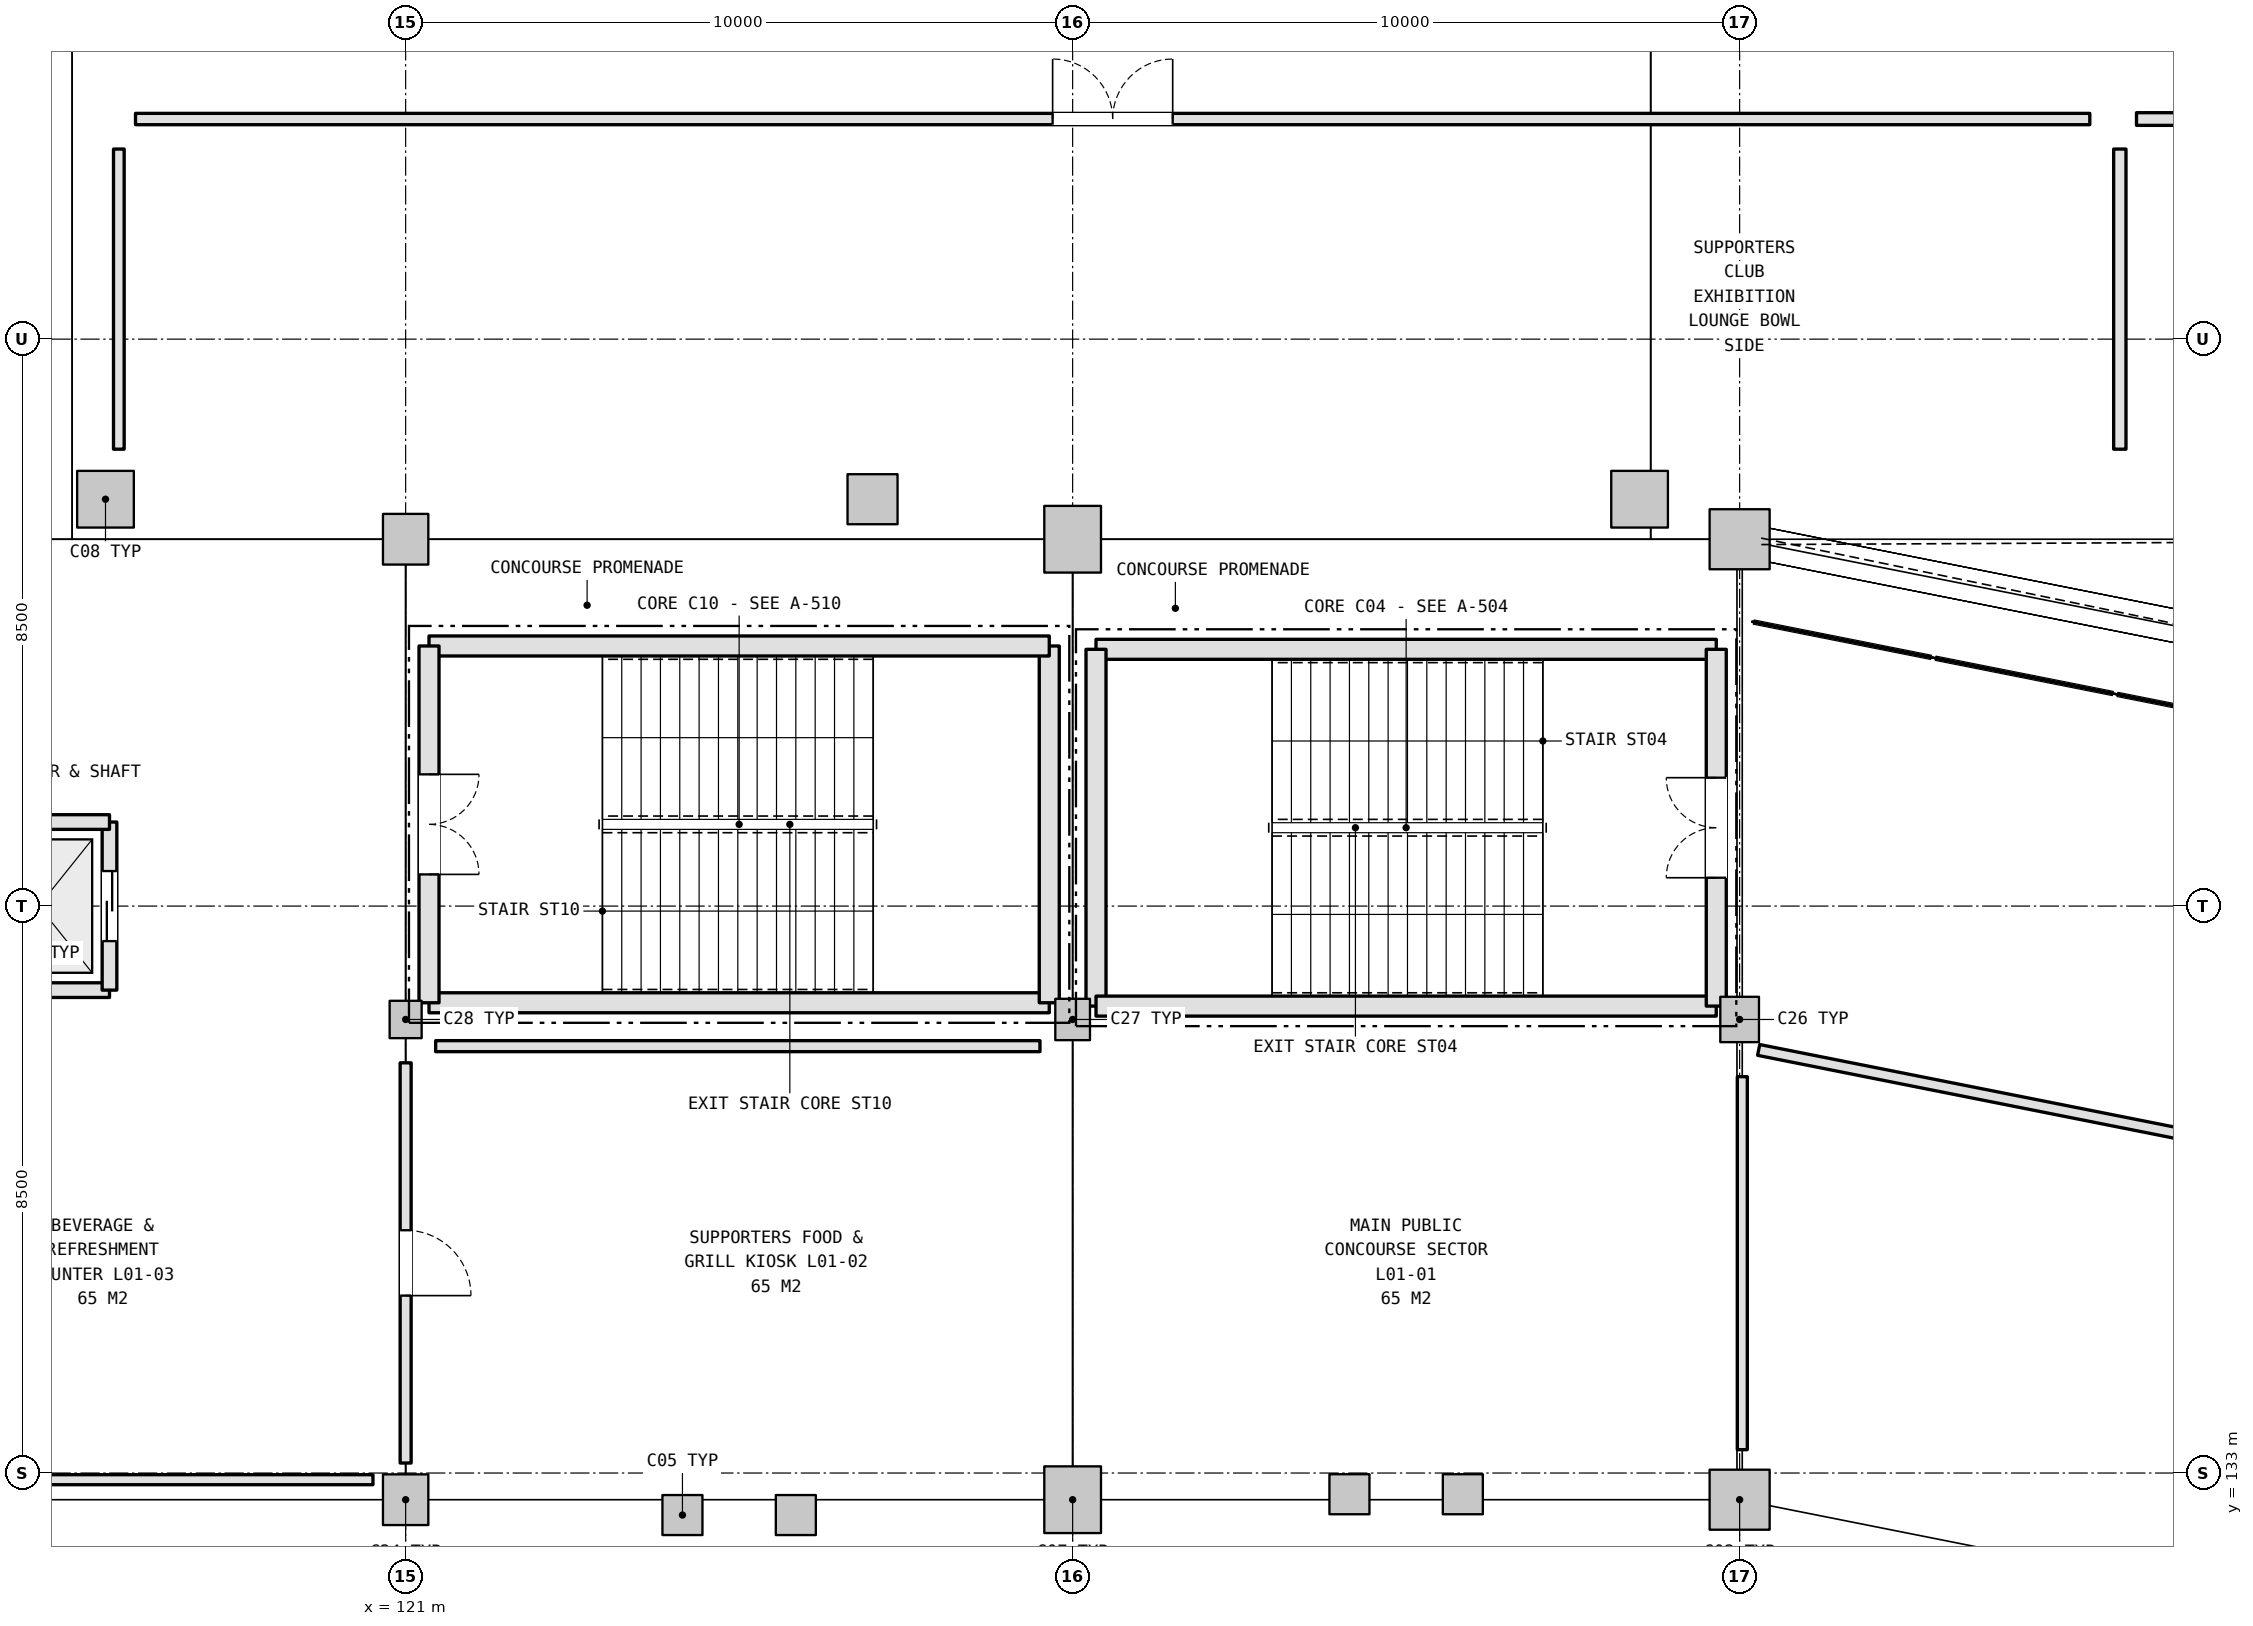
"""IFC4 building model, lengths in metres.
Left out: names, types, materials, properties, quantities, classifications, styles, units other than length and angle.
Written with IfcOpenShell. Run it as: python <this file> out.ifc"""

import sys

from ifc_helpers import new_model, si_unit, direction, frame, frame_2d, origin, origin_2d, place, context, subcontext, project, spatial, rectangle, extrude, element, fill, save


model = new_model("IFC4")
c1 = context("Model", 3, precision=1e-05, world=origin(), true_north=direction((0.0, 1.0)))
c2 = subcontext(c1, "Body", "Model", "MODEL_VIEW")
j1 = project(units=[si_unit("LENGTHUNIT", "METRE"), si_unit("PLANEANGLEUNIT", "RADIAN")], contexts=[c1])
p1 = place(None, origin())
s1 = spatial("IfcSite", under=j1, at=p1, CompositionType="ELEMENT")
p2 = place(p1, origin())
s2 = spatial("IfcBuilding", under=s1, at=p2, CompositionType="ELEMENT")
p3 = place(p2, frame((0.0, 0.0, 5.4)))
s3 = spatial("IfcBuildingStorey", under=s2, at=p3, CompositionType="ELEMENT", Elevation=5.4)
p4 = place(p3, frame((141.0, 132.6, 0.0), z_axis=(0.0, 0.0, 1.0), x_axis=(1.0, 0.0, 0.0)))
e1 = element("IfcColumn", 1, at=p4, inside=s3, PredefinedType="COLUMN", context=c2, shape_type="SweptSolid", body=[
    extrude(rectangle(XDim=0.9, YDim=0.9, at=origin_2d()), origin(), (0.0, 0.0, 1.0), 5.4),
])
p5 = place(p3, frame((141.0, 139.8, 0.0), z_axis=(0.0, 0.0, 1.0), x_axis=(1.0, 0.0, 0.0)))
e2 = element("IfcColumn", 2, at=p5, inside=s3, PredefinedType="COLUMN", context=c2, shape_type="SweptSolid", body=[
    extrude(rectangle(XDim=0.58, YDim=0.68, at=origin_2d()), origin(), (0.0, 0.0, 1.0), 5.4),
])
p6 = place(p3, frame((141.0, 147.0, 0.0), z_axis=(0.0, 0.0, 1.0), x_axis=(1.0, 0.0, 0.0)))
e3 = element("IfcColumn", 3, at=p6, inside=s3, PredefinedType="COLUMN", context=c2, shape_type="SweptSolid", body=[
    extrude(rectangle(XDim=0.9, YDim=0.9, at=origin_2d()), origin(), (0.0, 0.0, 1.0), 5.4),
])
p7 = place(p3, frame((131.0, 132.6, 0.0), z_axis=(0.0, 0.0, 1.0), x_axis=(1.0, 0.0, 0.0)))
e4 = element("IfcColumn", 4, at=p7, inside=s3, PredefinedType="COLUMN", context=c2, shape_type="SweptSolid", body=[
    extrude(rectangle(XDim=0.85, YDim=1.0, at=origin_2d()), origin(), (0.0, 0.0, 1.0), 5.4),
])
p8 = place(p3, frame((131.0, 139.8, 0.0), z_axis=(0.0, 0.0, 1.0), x_axis=(1.0, 0.0, 0.0)))
e5 = element("IfcColumn", 5, at=p8, inside=s3, PredefinedType="COLUMN", context=c2, shape_type="SweptSolid", body=[
    extrude(rectangle(XDim=0.52, YDim=0.62, at=origin_2d()), origin(), (0.0, 0.0, 1.0), 5.4),
])
p9 = place(p3, frame((131.0, 147.0, 0.0), z_axis=(0.0, 0.0, 1.0), x_axis=(1.0, 0.0, 0.0)))
e6 = element("IfcColumn", 6, at=p9, inside=s3, PredefinedType="COLUMN", context=c2, shape_type="SweptSolid", body=[
    extrude(rectangle(XDim=0.85, YDim=1.0, at=origin_2d()), origin(), (0.0, 0.0, 1.0), 5.4),
])
p10 = place(p3, frame((121.0, 132.6, 0.0), z_axis=(0.0, 0.0, 1.0), x_axis=(1.0, 0.0, 0.0)))
e7 = element("IfcColumn", 7, at=p10, inside=s3, PredefinedType="COLUMN", context=c2, shape_type="SweptSolid", body=[
    extrude(rectangle(XDim=0.68, YDim=0.76, at=origin_2d()), origin(), (0.0, 0.0, 1.0), 5.4),
])
p11 = place(p3, frame((121.0, 139.8, 0.0), z_axis=(0.0, 0.0, 1.0), x_axis=(1.0, 0.0, 0.0)))
e8 = element("IfcColumn", 8, at=p11, inside=s3, PredefinedType="COLUMN", context=c2, shape_type="SweptSolid", body=[
    extrude(rectangle(XDim=0.48, YDim=0.56, at=origin_2d()), origin(), (0.0, 0.0, 1.0), 5.4),
])
p12 = place(p3, frame((121.0, 147.0, 0.0), z_axis=(0.0, 0.0, 1.0), x_axis=(1.0, 0.0, 0.0)))
e9 = element("IfcColumn", 9, at=p12, inside=s3, PredefinedType="COLUMN", context=c2, shape_type="SweptSolid", body=[
    extrude(rectangle(XDim=0.68, YDim=0.76, at=origin_2d()), origin(), (0.0, 0.0, 1.0), 5.4),
])
p13 = place(p3, frame((116.5, 147.6, 0.0), z_axis=(0.0, 0.0, 1.0), x_axis=(1.0, 0.0, 0.0)))
e10 = element("IfcColumn", 10, at=p13, inside=s3, PredefinedType="COLUMN", context=c2, shape_type="SweptSolid", body=[
    extrude(rectangle(XDim=0.85, YDim=0.85, at=origin_2d()), origin(), (0.0, 0.0, 1.0), 5.4),
])
p14 = place(p3, frame((128.0, 147.6, 0.0), z_axis=(0.0, 0.0, 1.0), x_axis=(1.0, 0.0, 0.0)))
e11 = element("IfcColumn", 11, at=p14, inside=s3, PredefinedType="COLUMN", context=c2, shape_type="SweptSolid", body=[
    extrude(rectangle(XDim=0.75, YDim=0.75, at=origin_2d()), origin(), (0.0, 0.0, 1.0), 5.4),
])
p15 = place(p3, frame((139.5, 147.6, 0.0), z_axis=(0.0, 0.0, 1.0), x_axis=(1.0, 0.0, 0.0)))
e12 = element("IfcColumn", 12, at=p15, inside=s3, PredefinedType="COLUMN", context=c2, shape_type="SweptSolid", body=[
    extrude(rectangle(XDim=0.85, YDim=0.85, at=origin_2d()), origin(), (0.0, 0.0, 1.0), 5.4),
])
p16 = place(p3, frame((140.65, 145.35, 0.0), z_axis=(0.0, 0.0, 1.0), x_axis=(-1.0, 0.0, 0.0)))
e13 = element("IfcWall", 13, at=p16, inside=s3, PredefinedType="SHEAR", context=c2, shape_type="SweptSolid", body=[
    extrude(rectangle(XDim=9.299, YDim=0.3, at=frame_2d((4.65, 0.0))), origin(), (0.0, 0.0, 1.0), 5.14),
])
p17 = place(p3, frame((131.35, 145.35, 0.0), z_axis=(0.0, 0.0, 1.0), x_axis=(0.0, -1.0, 0.0)))
e14 = element("IfcWall", 14, at=p17, inside=s3, PredefinedType="SHEAR", context=c2, shape_type="SweptSolid", body=[
    extrude(rectangle(XDim=5.349, YDim=0.3, at=frame_2d((2.675, 0.0))), origin(), (0.0, 0.0, 1.0), 5.14),
])
p18 = place(p3, frame((131.35, 140.0, 0.0), z_axis=(0.0, 0.0, 1.0), x_axis=(1.0, 0.0, 0.0)))
e15 = element("IfcWall", 15, at=p18, inside=s3, PredefinedType="SHEAR", context=c2, shape_type="SweptSolid", body=[
    extrude(rectangle(XDim=9.299, YDim=0.3, at=frame_2d((4.65, 0.0))), origin(), (0.0, 0.0, 1.0), 5.14),
])
p19 = place(p3, frame((140.65, 140.0, 0.0), z_axis=(0.0, 0.0, 1.0), x_axis=(0.0, 1.0, 0.0)))
e16 = element("IfcWall", 16, at=p19, inside=s3, PredefinedType="SHEAR", context=c2, shape_type="SweptSolid", body=[
    extrude(rectangle(XDim=5.349, YDim=0.3, at=frame_2d((2.675, 0.0))), origin(), (0.0, 0.0, 1.0), 5.14),
])
p20 = place(p19, frame((1.925, 0.0, 0.0)))
e17 = element("IfcOpeningElement", 17, at=p20, cuts=e16, PredefinedType="OPENING", context=c2, shape_type="SweptSolid", body=[
    extrude(rectangle(XDim=1.5, YDim=2.2, at=frame_2d((0.75, 1.1))), frame((0.0, 0.16, 0.0), z_axis=(0.0, -1.0, 0.0), x_axis=(1.0, 0.0, 0.0)), (0.0, 0.0, 1.0), 0.32),
])
p21 = place(p3, frame((121.35, 140.05, 0.0), z_axis=(0.0, 0.0, 1.0), x_axis=(1.0, 0.0, 0.0)))
e18 = element("IfcWall", 18, at=p21, inside=s3, PredefinedType="SHEAR", context=c2, shape_type="SweptSolid", body=[
    extrude(rectangle(XDim=9.299, YDim=0.3, at=frame_2d((4.65, 0.0))), origin(), (0.0, 0.0, 1.0), 5.14),
])
p22 = place(p3, frame((130.65, 140.05, 0.0), z_axis=(0.0, 0.0, 1.0), x_axis=(0.0, 1.0, 0.0)))
e19 = element("IfcWall", 19, at=p22, inside=s3, PredefinedType="SHEAR", context=c2, shape_type="SweptSolid", body=[
    extrude(rectangle(XDim=5.349, YDim=0.3, at=frame_2d((2.675, 0.0))), origin(), (0.0, 0.0, 1.0), 5.14),
])
p23 = place(p3, frame((130.65, 145.4, 0.0), z_axis=(0.0, 0.0, 1.0), x_axis=(-1.0, 0.0, 0.0)))
e20 = element("IfcWall", 20, at=p23, inside=s3, PredefinedType="SHEAR", context=c2, shape_type="SweptSolid", body=[
    extrude(rectangle(XDim=9.299, YDim=0.3, at=frame_2d((4.65, 0.0))), origin(), (0.0, 0.0, 1.0), 5.14),
])
p24 = place(p3, frame((121.35, 145.4, 0.0), z_axis=(0.0, 0.0, 1.0), x_axis=(0.0, -1.0, 0.0)))
e21 = element("IfcWall", 21, at=p24, inside=s3, PredefinedType="SHEAR", context=c2, shape_type="SweptSolid", body=[
    extrude(rectangle(XDim=5.349, YDim=0.3, at=frame_2d((2.675, 0.0))), origin(), (0.0, 0.0, 1.0), 5.14),
])
p25 = place(p24, frame((1.925, 0.0, 0.0)))
e22 = element("IfcOpeningElement", 22, at=p25, cuts=e21, PredefinedType="OPENING", context=c2, shape_type="SweptSolid", body=[
    extrude(rectangle(XDim=1.5, YDim=2.2, at=frame_2d((0.75, 1.1))), frame((0.0, 0.16, 0.0), z_axis=(0.0, -1.0, 0.0), x_axis=(1.0, 0.0, 0.0)), (0.0, 0.0, 1.0), 0.32),
])
for number, where, z_axis, x_axis in (
    (23, (125.15, 132.37, 0.0), (0.0, 0.0, 1.0), (1.0, 0.0, 0.0)),
    (24, (126.85, 132.37, 0.0), (0.0, 0.0, 1.0), (1.0, 0.0, 0.0)),
    (25, (135.15, 132.682, 0.0), (0.0, 0.0, 1.0), (1.0, 0.0, 0.0)),
    (26, (136.85, 132.682, 0.0), (0.0, 0.0, 1.0), (1.0, 0.0, 0.0)),
):
    element("IfcColumn", number, at=place(p3, frame(where, z_axis=z_axis, x_axis=x_axis)), inside=s3, PredefinedType="COLUMN", context=c2, shape_type="SweptSolid", body=[
        extrude(rectangle(XDim=0.6, YDim=0.6, at=origin_2d()), origin(), (0.0, 0.0, 1.0), 5.4),
    ])
p26 = place(p3, frame((114.44, 140.24, 0.0), z_axis=(0.0, 0.0, 1.0), x_axis=(1.0, 0.0, 0.0)))
e27 = element("IfcWall", 27, at=p26, inside=s3, PredefinedType="SHEAR", context=c2, shape_type="SweptSolid", body=[
    extrude(rectangle(XDim=2.12, YDim=0.22, at=frame_2d((1.06, 0.0))), origin(), (0.0, 0.0, 1.0), 5.14),
])
p27 = place(p3, frame((116.56, 140.24, 0.0), z_axis=(0.0, 0.0, 1.0), x_axis=(0.0, 1.0, 0.0)))
e28 = element("IfcWall", 28, at=p27, inside=s3, PredefinedType="SHEAR", context=c2, shape_type="SweptSolid", body=[
    extrude(rectangle(XDim=2.52, YDim=0.22, at=frame_2d((1.26, 0.0))), origin(), (0.0, 0.0, 1.0), 5.14),
])
p28 = place(p27, frame((0.735, 0.0, 0.0)))
e29 = element("IfcOpeningElement", 29, at=p28, cuts=e28, PredefinedType="OPENING", context=c2, shape_type="SweptSolid", body=[
    extrude(rectangle(XDim=1.05, YDim=2.15, at=frame_2d((0.525, 1.075))), frame((0.0, 0.12, 0.0), z_axis=(0.0, -1.0, 0.0), x_axis=(1.0, 0.0, 0.0)), (0.0, 0.0, 1.0), 0.24),
])
p29 = place(p3, frame((116.56, 142.76, 0.0), z_axis=(0.0, 0.0, 1.0), x_axis=(-1.0, 0.0, 0.0)))
e30 = element("IfcWall", 30, at=p29, inside=s3, PredefinedType="SHEAR", context=c2, shape_type="SweptSolid", body=[
    extrude(rectangle(XDim=2.12, YDim=0.22, at=frame_2d((1.06, 0.0))), origin(), (0.0, 0.0, 1.0), 5.14),
])
p30 = place(p3, frame((116.95, 153.3, 0.0), z_axis=(0.0, 0.0, 1.0), x_axis=(1.0, 0.0, 0.0)))
e31 = element("IfcWall", 31, at=p30, inside=s3, PredefinedType="PARTITIONING", context=c2, shape_type="SweptSolid", body=[
    extrude(rectangle(XDim=29.3, YDim=0.17, at=frame_2d((14.65, 0.0))), origin(), (0.0, 0.0, 1.0), 4.525),
])
p31 = place(p30, frame((13.75, 0.0, 0.0)))
e32 = element("IfcOpeningElement", 32, at=p31, cuts=e31, PredefinedType="OPENING", context=c2, shape_type="SweptSolid", body=[
    extrude(rectangle(XDim=1.8, YDim=2.2, at=frame_2d((0.9, 1.1))), frame((0.0, 0.095, 0.0), z_axis=(0.0, -1.0, 0.0), x_axis=(1.0, 0.0, 0.0)), (0.0, 0.0, 1.0), 0.19),
])
p32 = place(p3, frame((116.7, 148.35, 0.0), z_axis=(0.0, 0.0, 1.0), x_axis=(0.0, 1.0, 0.0)))
e33 = element("IfcWall", 33, at=p32, inside=s3, PredefinedType="PARTITIONING", context=c2, shape_type="SweptSolid", body=[
    extrude(rectangle(XDim=4.5, YDim=0.16, at=frame_2d((2.25, 0.0))), origin(), (0.0, 0.0, 1.0), 4.475),
])
p33 = place(p3, frame((146.95, 153.3, 0.0), z_axis=(0.0, 0.0, 1.0), x_axis=(1.0, 0.0, 0.0)))
e34 = element("IfcWall", 34, at=p33, inside=s3, PredefinedType="PARTITIONING", context=c2, shape_type="SweptSolid", body=[
    extrude(rectangle(XDim=19.3, YDim=0.19, at=frame_2d((9.65, 0.0))), origin(), (0.0, 0.0, 1.0), 4.525),
])
p34 = place(p33, frame((9.2, 0.0, 0.0)))
e35 = element("IfcOpeningElement", 35, at=p34, cuts=e34, PredefinedType="OPENING", context=c2, shape_type="SweptSolid", body=[
    extrude(rectangle(XDim=0.9, YDim=2.1, at=frame_2d((0.45, 1.05))), frame((0.0, 0.105, 0.0), z_axis=(0.0, -1.0, 0.0), x_axis=(1.0, 0.0, 0.0)), (0.0, 0.0, 1.0), 0.21),
])
p35 = place(p3, frame((146.7, 148.35, 0.0), z_axis=(0.0, 0.0, 1.0), x_axis=(0.0, 1.0, 0.0)))
e36 = element("IfcWall", 36, at=p35, inside=s3, PredefinedType="PARTITIONING", context=c2, shape_type="SweptSolid", body=[
    extrude(rectangle(XDim=4.5, YDim=0.185, at=frame_2d((2.25, 0.0))), origin(), (0.0, 0.0, 1.0), 4.675),
])
p36 = place(p3, frame((121.0, 133.15, 0.0), z_axis=(0.0, 0.0, 1.0), x_axis=(0.0, 1.0, 0.0)))
e37 = element("IfcWall", 37, at=p36, inside=s3, PredefinedType="PARTITIONING", context=c2, shape_type="SweptSolid", body=[
    extrude(rectangle(XDim=6.0, YDim=0.165, at=frame_2d((3.0, 0.0))), origin(), (0.0, 0.0, 1.0), 4.375),
])
p37 = place(p36, frame((2.51, 0.0, 0.0)))
e38 = element("IfcOpeningElement", 38, at=p37, cuts=e37, PredefinedType="OPENING", context=c2, shape_type="SweptSolid", body=[
    extrude(rectangle(XDim=0.98, YDim=2.15, at=frame_2d((0.49, 1.075))), frame((0.0, 0.093, 0.0), z_axis=(0.0, -1.0, 0.0), x_axis=(1.0, 0.0, 0.0)), (0.0, 0.0, 1.0), 0.185),
])
p38 = place(p3, frame((121.45, 139.4, 0.0), z_axis=(0.0, 0.0, 1.0), x_axis=(1.0, 0.0, 0.0)))
e39 = element("IfcWall", 39, at=p38, inside=s3, PredefinedType="PARTITIONING", context=c2, shape_type="SweptSolid", body=[
    extrude(rectangle(XDim=9.06, YDim=0.165, at=frame_2d((4.53, 0.0))), origin(), (0.0, 0.0, 1.0), 5.12),
])
p39 = place(p3, frame((120.51, 132.9, 0.0), z_axis=(0.0, 0.0, 1.0), x_axis=(-1.0, 0.0, 0.0)))
e40 = element("IfcWall", 40, at=p39, inside=s3, PredefinedType="PARTITIONING", context=c2, shape_type="SweptSolid", body=[
    extrude(rectangle(XDim=9.06, YDim=0.15, at=frame_2d((4.53, 0.0))), origin(), (0.0, 0.0, 1.0), 4.405),
])
p40 = place(p3, frame((141.285, 139.343, 0.0), z_axis=(0.0, 0.0, 1.0), x_axis=(0.980784295226, -0.195095274771, 0.0)))
e41 = element("IfcWall", 41, at=p40, inside=s3, PredefinedType="PARTITIONING", context=c2, shape_type="SweptSolid", body=[
    extrude(rectangle(XDim=16.742, YDim=0.165, at=frame_2d((8.371, 0.0))), origin(), (0.0, 0.0, 1.0), 4.305),
])
p41 = place(p40, frame((7.811, 0.0, 0.0)))
e42 = element("IfcOpeningElement", 42, at=p41, cuts=e41, PredefinedType="OPENING", context=c2, shape_type="SweptSolid", body=[
    extrude(rectangle(XDim=1.12, YDim=2.2, at=frame_2d((0.56, 1.1))), frame((0.0, 0.093, 0.0), z_axis=(0.0, -1.0, 0.0), x_axis=(1.0, 0.0, 0.0)), (0.0, 0.0, 1.0), 0.185),
])
p42 = place(p3, frame((141.04, 133.35, 0.0), z_axis=(0.0, 0.0, 1.0), x_axis=(0.0, 1.0, 0.0)))
e43 = element("IfcWall", 43, at=p42, inside=s3, PredefinedType="PARTITIONING", context=c2, shape_type="SweptSolid", body=[
    extrude(rectangle(XDim=5.592, YDim=0.15, at=frame_2d((2.796, 0.0))), origin(), (0.0, 0.0, 1.0), 4.305),
])
p43 = place(p20, origin())
e44 = element("IfcDoor", 44, at=p43, inside=s3, OperationType="DOUBLE_DOOR_SINGLE_SWING", PredefinedType="DOOR", context=c2, shape_type="SweptSolid", body=[
    extrude(rectangle(XDim=1.5, YDim=2.2, at=frame_2d((0.75, 1.1))), frame((0.0, 0.025, 0.0), z_axis=(0.0, -1.0, 0.0), x_axis=(1.0, 0.0, 0.0)), (0.0, 0.0, 1.0), 0.05),
])
fill(e17, e44)
p44 = place(p25, origin())
e45 = element("IfcDoor", 45, at=p44, inside=s3, OperationType="DOUBLE_DOOR_SINGLE_SWING", PredefinedType="DOOR", context=c2, shape_type="SweptSolid", body=[
    extrude(rectangle(XDim=1.5, YDim=2.2, at=frame_2d((0.75, 1.1))), frame((0.0, 0.025, 0.0), z_axis=(0.0, -1.0, 0.0), x_axis=(1.0, 0.0, 0.0)), (0.0, 0.0, 1.0), 0.05),
])
fill(e22, e45)
p45 = place(p28, origin())
e46 = element("IfcDoor", 46, at=p45, inside=s3, OperationType="DOUBLE_DOOR_SLIDING", PredefinedType="DOOR", context=c2, shape_type="SweptSolid", body=[
    extrude(rectangle(XDim=1.05, YDim=2.15, at=frame_2d((0.525, 1.075))), frame((0.0, 0.025, 0.0), z_axis=(0.0, -1.0, 0.0), x_axis=(1.0, 0.0, 0.0)), (0.0, 0.0, 1.0), 0.05),
])
fill(e29, e46)
p46 = place(p31, origin())
e47 = element("IfcDoor", 47, at=p46, inside=s3, OperationType="DOUBLE_DOOR_SINGLE_SWING", PredefinedType="DOOR", context=c2, shape_type="SweptSolid", body=[
    extrude(rectangle(XDim=1.8, YDim=2.2, at=frame_2d((0.9, 1.1))), frame((0.0, 0.025, 0.0), z_axis=(0.0, -1.0, 0.0), x_axis=(1.0, 0.0, 0.0)), (0.0, 0.0, 1.0), 0.05),
])
fill(e32, e47)
p47 = place(p37, frame((0.98, 0.0, 0.0), z_axis=(0.0, 0.0, 1.0), x_axis=(-1.0, 0.0, 0.0)))
e48 = element("IfcDoor", 48, at=p47, inside=s3, OperationType="SINGLE_SWING_LEFT", PredefinedType="DOOR", context=c2, shape_type="SweptSolid", body=[
    extrude(rectangle(XDim=0.98, YDim=2.15, at=frame_2d((0.49, 1.075))), frame((0.0, 0.025, 0.0), z_axis=(0.0, -1.0, 0.0), x_axis=(1.0, 0.0, 0.0)), (0.0, 0.0, 1.0), 0.05),
])
fill(e38, e48)
save(model, sys.argv[1])
